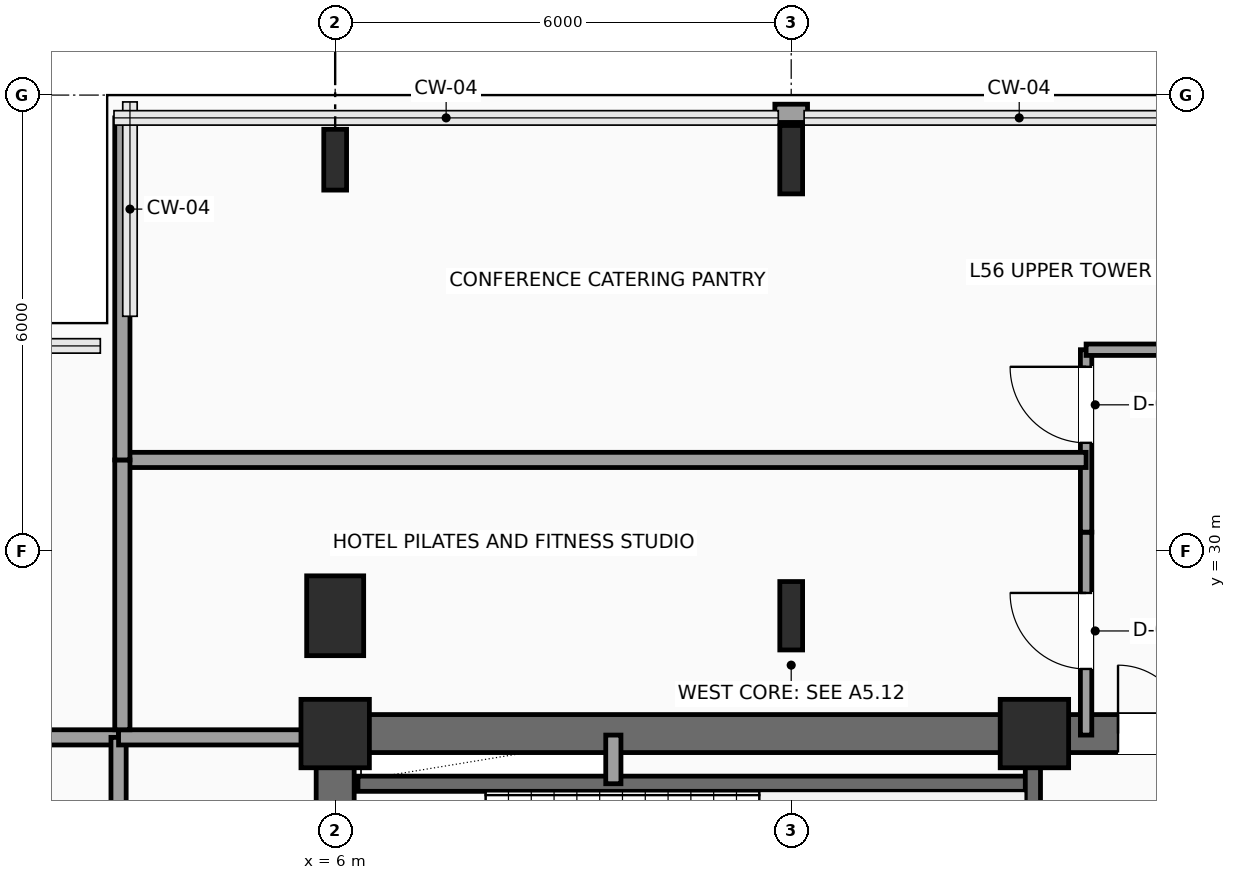
"""IFC4 building model, lengths in metres.
Left out: names, types, materials, properties, quantities, classifications, styles, units other than length and angle.
Written with IfcOpenShell. Run it as: python <this file> out.ifc"""

import sys

from ifc_helpers import new_model, si_unit, direction, frame, frame_2d, origin, origin_2d, place, context, subcontext, project, spatial, rectangle, i_section, extrude, element, fill, save


model = new_model("IFC4")
c1 = context("Model", 3, precision=1e-05, world=origin(), true_north=direction((0.0, 1.0)))
c2 = subcontext(c1, "Body", "Model", "MODEL_VIEW")
j1 = project(units=[si_unit("LENGTHUNIT", "METRE"), si_unit("PLANEANGLEUNIT", "RADIAN")], contexts=[c1])
p1 = place(None, origin())
s1 = spatial("IfcSite", under=j1, at=p1, CompositionType="ELEMENT")
p2 = place(p1, origin())
s2 = spatial("IfcBuilding", under=s1, at=p2, CompositionType="ELEMENT")
p3 = place(p2, frame((0.0, 0.0, 227.4)))
s3 = spatial("IfcBuildingStorey", under=s2, at=p3, CompositionType="ELEMENT", Elevation=227.4)
for number, where, z_axis, x_axis in (
    (1, (6.0, 27.6, 0.0), (0.0, 0.0, 1.0), (1.0, 0.0, 0.0)),
    (2, (15.2, 27.6, 0.0), (0.0, 0.0, 1.0), (1.0, 0.0, 0.0)),
):
    element("IfcColumn", number, at=place(p3, frame(where, z_axis=z_axis, x_axis=x_axis)), inside=s3, PredefinedType="COLUMN", context=c2, shape_type="SweptSolid", body=[
        extrude(rectangle(XDim=0.9, YDim=0.9, at=origin_2d()), origin(), (0.0, 0.0, 1.0), 3.75),
    ])
p4 = place(p3, frame((6.0, 29.15, 0.0), z_axis=(0.0, 0.0, 1.0), x_axis=(1.0, 0.0, 0.0)))
e3 = element("IfcColumn", 3, at=p4, inside=s3, PredefinedType="COLUMN", context=c2, shape_type="SweptSolid", body=[
    extrude(rectangle(XDim=0.75, YDim=1.05, at=origin_2d()), origin(), (0.0, 0.0, 1.0), 3.75),
])
p5 = place(p3, frame((6.0, 35.15, 0.0), z_axis=(0.0, 0.0, 1.0), x_axis=(1.0, 0.0, 0.0)))
e4 = element("IfcColumn", 4, at=p5, inside=s3, PredefinedType="COLUMN", context=c2, shape_type="SweptSolid", body=[
    extrude(i_section(OverallWidth=0.3, OverallDepth=0.8, WebThickness=0.018, FlangeThickness=0.033, FilletRadius=0.03, at=origin_2d()), origin(), (0.0, 0.0, 1.0), 3.75),
])
for number, where, z_axis, x_axis in (
    (5, (12.0, 29.15, 0.0), (0.0, 0.0, 1.0), (1.0, 0.0, 0.0)),
    (6, (12.0, 35.15, 0.0), (0.0, 0.0, 1.0), (1.0, 0.0, 0.0)),
):
    element("IfcColumn", number, at=place(p3, frame(where, z_axis=z_axis, x_axis=x_axis)), inside=s3, PredefinedType="COLUMN", context=c2, shape_type="SweptSolid", body=[
        extrude(i_section(OverallWidth=0.3, OverallDepth=0.9, WebThickness=0.019, FlangeThickness=0.035, FilletRadius=0.03, at=origin_2d()), origin(), (0.0, 0.0, 1.0), 3.75),
    ])
p6 = place(p3, frame((11.785, 35.76, 0.0), z_axis=(0.0, 0.0, 1.0), x_axis=(1.0, 0.0, 0.0)))
e7 = element("IfcWall", 7, at=p6, inside=s3, PredefinedType="SOLIDWALL", context=c2, shape_type="SweptSolid", body=[
    extrude(rectangle(XDim=0.43, YDim=0.24, at=frame_2d((0.215, 0.0))), origin(), (0.0, 0.0, 1.0), 3.54),
])
p7 = place(p3, frame((6.0, 27.6, 0.0), z_axis=(0.0, 0.0, 1.0), x_axis=(1.0, 0.0, 0.0)))
e8 = element("IfcWall", 8, at=p7, inside=s3, PredefinedType="SHEAR", context=c2, shape_type="SweptSolid", body=[
    extrude(rectangle(XDim=12.0, YDim=0.5, at=frame_2d((6.0, 0.0))), origin(), (0.0, 0.0, 1.0), 3.54),
])
p8 = place(p7, frame((10.3, 0.0, 0.0)))
e9 = element("IfcOpeningElement", 9, at=p8, cuts=e8, PredefinedType="OPENING", context=c2, shape_type="SweptSolid", body=[
    extrude(rectangle(XDim=0.9, YDim=2.15, at=frame_2d((0.45, 1.075))), frame((0.0, 0.26, 0.0), z_axis=(0.0, -1.0, 0.0), x_axis=(1.0, 0.0, 0.0)), (0.0, 0.0, 1.0), 0.52),
])
p9 = place(p3, frame((6.0, 18.0, 0.0), z_axis=(0.0, 0.0, 1.0), x_axis=(0.0, 1.0, 0.0)))
e10 = element("IfcWall", 10, at=p9, inside=s3, PredefinedType="SHEAR", context=c2, shape_type="SweptSolid", body=[
    extrude(rectangle(XDim=9.6, YDim=0.5, at=frame_2d((4.8, 0.0))), origin(), (0.0, 0.0, 1.0), 3.54),
])
p10 = place(p3, frame((6.3, 26.94, 0.0), z_axis=(0.0, 0.0, 1.0), x_axis=(1.0, 0.0, 0.0)))
e11 = element("IfcWall", 11, at=p10, inside=s3, PredefinedType="SHEAR", context=c2, shape_type="SweptSolid", body=[
    extrude(rectangle(XDim=8.88, YDim=0.2, at=frame_2d((4.44, 0.0))), origin(), (0.0, 0.0, 1.0), 3.54),
])
p11 = place(p3, frame((15.18, 23.26, 0.0), z_axis=(0.0, 0.0, 1.0), x_axis=(0.0, 1.0, 0.0)))
e12 = element("IfcWall", 12, at=p11, inside=s3, PredefinedType="SHEAR", context=c2, shape_type="SweptSolid", body=[
    extrude(rectangle(XDim=4.04, YDim=0.2, at=frame_2d((2.02, 0.0))), origin(), (0.0, 0.0, 1.0), 3.54),
])
p12 = place(p3, frame((9.66, 26.94, 0.0), z_axis=(0.0, 0.0, 1.0), x_axis=(0.0, 1.0, 0.0)))
e13 = element("IfcWall", 13, at=p12, inside=s3, PredefinedType="SOLIDWALL", context=c2, shape_type="SweptSolid", body=[
    extrude(rectangle(XDim=0.64, YDim=0.2, at=frame_2d((0.32, 0.0))), origin(), (0.0, 0.0, 1.0), 3.54),
])
p13 = place(p3, frame((15.88, 27.58, 0.0), z_axis=(0.0, 0.0, 1.0), x_axis=(0.0, 1.0, 0.0)))
e14 = element("IfcWall", 14, at=p13, inside=s3, PredefinedType="PARTITIONING", context=c2, shape_type="SweptSolid", body=[
    extrude(rectangle(XDim=2.67, YDim=0.15, at=frame_2d((1.335, 0.0))), origin(), (0.0, 0.0, 1.0), 3.54),
])
p14 = place(p13, frame((0.87, 0.0, 0.0)))
e15 = element("IfcOpeningElement", 15, at=p14, cuts=e14, PredefinedType="OPENING", context=c2, shape_type="SweptSolid", body=[
    extrude(rectangle(XDim=1.0, YDim=2.2, at=frame_2d((0.5, 1.1))), frame((0.0, 0.085, 0.0), z_axis=(0.0, -1.0, 0.0), x_axis=(1.0, 0.0, 0.0)), (0.0, 0.0, 1.0), 0.17),
])
p15 = place(p3, frame((15.88, 30.25, 0.0), z_axis=(0.0, 0.0, 1.0), x_axis=(0.0, 1.0, 0.0)))
e16 = element("IfcWall", 16, at=p15, inside=s3, PredefinedType="PARTITIONING", context=c2, shape_type="SweptSolid", body=[
    extrude(rectangle(XDim=2.4, YDim=0.15, at=frame_2d((1.2, 0.0))), origin(), (0.0, 0.0, 1.0), 3.54),
])
p16 = place(p15, frame((1.175, 0.0, 0.0)))
e17 = element("IfcOpeningElement", 17, at=p16, cuts=e16, PredefinedType="OPENING", context=c2, shape_type="SweptSolid", body=[
    extrude(rectangle(XDim=1.0, YDim=2.2, at=frame_2d((0.5, 1.1))), frame((0.0, 0.085, 0.0), z_axis=(0.0, -1.0, 0.0), x_axis=(1.0, 0.0, 0.0)), (0.0, 0.0, 1.0), 0.17),
])
p17 = place(p3, frame((15.88, 32.65, 0.0), z_axis=(0.0, 0.0, 1.0), x_axis=(1.0, 0.0, 0.0)))
e18 = element("IfcWall", 18, at=p17, inside=s3, PredefinedType="PARTITIONING", context=c2, shape_type="SweptSolid", body=[
    extrude(rectangle(XDim=2.22, YDim=0.15, at=frame_2d((1.11, 0.0))), origin(), (0.0, 0.0, 1.0), 3.54),
])
p18 = place(p3, frame((0.3, 27.55, 0.0), z_axis=(0.0, 0.0, 1.0), x_axis=(1.0, 0.0, 0.0)))
e19 = element("IfcWall", 19, at=p18, inside=s3, PredefinedType="PARTITIONING", context=c2, shape_type="SweptSolid", body=[
    extrude(rectangle(XDim=2.85, YDim=0.2, at=frame_2d((1.425, 0.0))), origin(), (0.0, 0.0, 1.0), 3.54),
])
p19 = place(p3, frame((3.15, 16.15, 0.0), z_axis=(0.0, 0.0, 1.0), x_axis=(0.0, 1.0, 0.0)))
e20 = element("IfcWall", 20, at=p19, inside=s3, PredefinedType="PARTITIONING", context=c2, shape_type="SweptSolid", body=[
    extrude(rectangle(XDim=11.4, YDim=0.2, at=frame_2d((5.7, 0.0))), origin(), (0.0, 0.0, 1.0), 3.54),
])
p20 = place(p3, frame((3.15, 27.55, 0.0), z_axis=(0.0, 0.0, 1.0), x_axis=(1.0, 0.0, 0.0)))
e21 = element("IfcWall", 21, at=p20, inside=s3, PredefinedType="PARTITIONING", context=c2, shape_type="SweptSolid", body=[
    extrude(rectangle(XDim=2.8, YDim=0.2, at=frame_2d((1.4, 0.0))), origin(), (0.0, 0.0, 1.0), 3.54),
])
p21 = place(p3, frame((3.2, 31.2, 0.0), z_axis=(0.0, 0.0, 1.0), x_axis=(1.0, 0.0, 0.0)))
e22 = element("IfcWall", 22, at=p21, inside=s3, PredefinedType="PARTITIONING", context=c2, shape_type="SweptSolid", body=[
    extrude(rectangle(XDim=12.68, YDim=0.2, at=frame_2d((6.34, 0.0))), origin(), (0.0, 0.0, 1.0), 3.54),
])
p22 = place(p3, frame((3.2, 27.65, 0.0), z_axis=(0.0, 0.0, 1.0), x_axis=(0.0, 1.0, 0.0)))
e23 = element("IfcWall", 23, at=p22, inside=s3, PredefinedType="PARTITIONING", context=c2, shape_type="SweptSolid", body=[
    extrude(rectangle(XDim=3.55, YDim=0.2, at=frame_2d((1.775, 0.0))), origin(), (0.0, 0.0, 1.0), 3.54),
])
p23 = place(p3, frame((3.2, 31.2, 0.0), z_axis=(0.0, 0.0, 1.0), x_axis=(0.0, 1.0, 0.0)))
e24 = element("IfcWall", 24, at=p23, inside=s3, PredefinedType="PARTITIONING", context=c2, shape_type="SweptSolid", body=[
    extrude(rectangle(XDim=4.5, YDim=0.2, at=frame_2d((2.25, 0.0))), origin(), (0.0, 0.0, 1.0), 3.54),
])
p24 = place(p8, origin())
e25 = element("IfcDoor", 25, at=p24, inside=s3, OperationType="SINGLE_SWING_LEFT", PredefinedType="DOOR", context=c2, shape_type="SweptSolid", body=[
    extrude(rectangle(XDim=0.9, YDim=2.15, at=frame_2d((0.45, 1.075))), frame((0.0, 0.025, 0.0), z_axis=(0.0, -1.0, 0.0), x_axis=(1.0, 0.0, 0.0)), (0.0, 0.0, 1.0), 0.05),
])
fill(e9, e25)
p25 = place(p14, origin())
e26 = element("IfcDoor", 26, at=p25, inside=s3, OperationType="SINGLE_SWING_RIGHT", PredefinedType="DOOR", context=c2, shape_type="SweptSolid", body=[
    extrude(rectangle(XDim=1.0, YDim=2.2, at=frame_2d((0.5, 1.1))), frame((0.0, 0.025, 0.0), z_axis=(0.0, -1.0, 0.0), x_axis=(1.0, 0.0, 0.0)), (0.0, 0.0, 1.0), 0.05),
])
fill(e15, e26)
p26 = place(p16, origin())
e27 = element("IfcDoor", 27, at=p26, inside=s3, OperationType="SINGLE_SWING_RIGHT", PredefinedType="DOOR", context=c2, shape_type="SweptSolid", body=[
    extrude(rectangle(XDim=1.0, YDim=2.2, at=frame_2d((0.5, 1.1))), frame((0.0, 0.025, 0.0), z_axis=(0.0, -1.0, 0.0), x_axis=(1.0, 0.0, 0.0)), (0.0, 0.0, 1.0), 0.05),
])
fill(e17, e27)
save(model, sys.argv[1])
